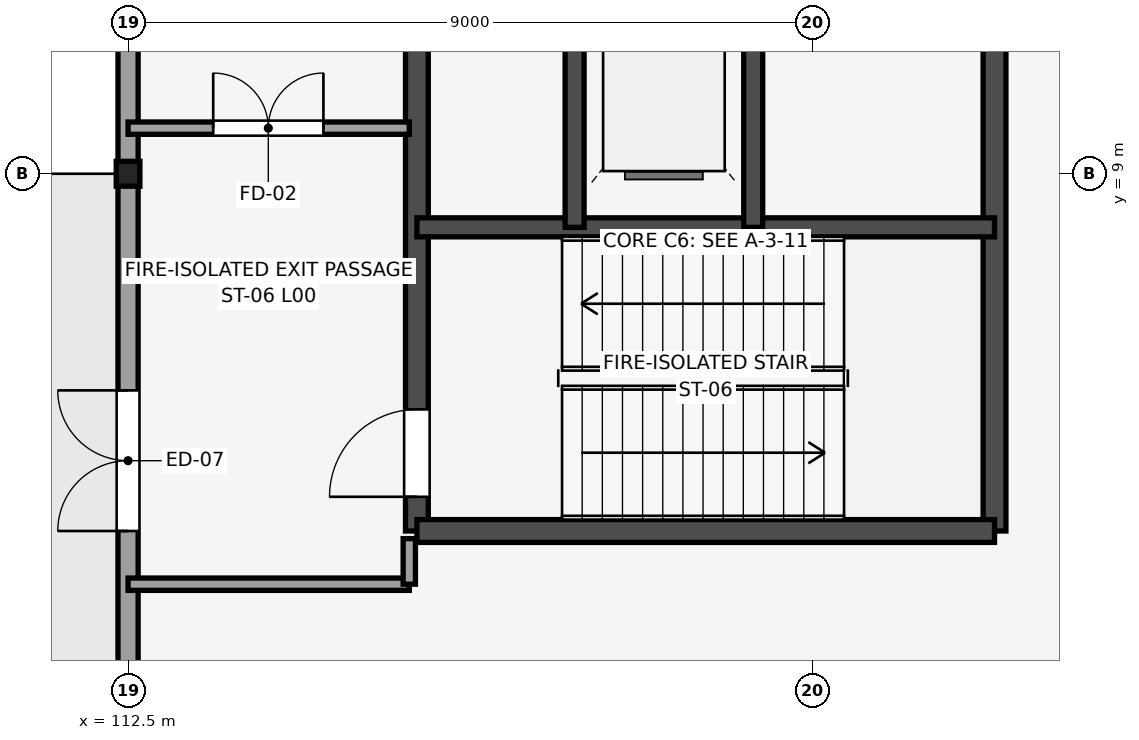
"""IFC4 building model, lengths in metres.
Left out: names, types, materials, properties, quantities, classifications, styles, units other than length and angle.
Written with IfcOpenShell. Run it as: python <this file> out.ifc"""

import sys

from ifc_helpers import new_model, si_unit, direction, frame, frame_2d, origin, origin_2d, place, context, subcontext, project, spatial, rectangle, i_section, extrude, element, fill, save


model = new_model("IFC4")
c1 = context("Model", 3, precision=1e-05, world=origin(), true_north=direction((0.0, 1.0)))
c2 = subcontext(c1, "Body", "Model", "MODEL_VIEW")
j1 = project(units=[si_unit("LENGTHUNIT", "METRE"), si_unit("PLANEANGLEUNIT", "RADIAN")], contexts=[c1])
p1 = place(None, origin())
s1 = spatial("IfcSite", under=j1, at=p1, CompositionType="ELEMENT")
p2 = place(p1, origin())
s2 = spatial("IfcBuilding", under=s1, at=p2, CompositionType="ELEMENT")
p3 = place(p2, origin())
s3 = spatial("IfcBuildingStorey", under=s2, at=p3, CompositionType="ELEMENT", Elevation=0.0)
p4 = place(p3, frame((112.5, 9.0, -0.24), z_axis=(0.0, 0.0, 1.0), x_axis=(1.0, 0.0, 0.0)))
e1 = element("IfcColumn", 1, at=p4, inside=s3, PredefinedType="COLUMN", context=c2, shape_type="SweptSolid", body=[
    extrude(i_section(OverallWidth=0.311, OverallDepth=0.327, WebThickness=0.016, FlangeThickness=0.025, FilletRadius=0.017, at=origin_2d()), origin(), (0.0, 0.0, 1.0), 5.64),
])
p5 = place(p3, frame((116.3, 4.3, -0.24), z_axis=(0.0, 0.0, 1.0), x_axis=(0.0, 1.0, 0.0)))
e2 = element("IfcWall", 2, at=p5, inside=s3, PredefinedType="SHEAR", context=c2, shape_type="SweptSolid", body=[
    extrude(rectangle(XDim=7.6, YDim=0.3, at=frame_2d((3.8, 0.0))), origin(), (0.0, 0.0, 1.0), 5.64),
])
p6 = place(p5, frame((0.45, 0.0, 0.24)))
e3 = element("IfcOpeningElement", 3, at=p6, cuts=e2, PredefinedType="OPENING", context=c2, shape_type="SweptSolid", body=[
    extrude(rectangle(XDim=1.15, YDim=2.15, at=frame_2d((0.575, 1.075))), frame((0.0, 0.16, 0.0), z_axis=(0.0, -1.0, 0.0), x_axis=(1.0, 0.0, 0.0)), (0.0, 0.0, 1.0), 0.32),
])
for number, where, z_axis, x_axis in (
    (4, (123.9, 4.3, -0.24), (0.0, 0.0, 1.0), (0.0, 1.0, 0.0)),
    (5, (116.3, 4.3, -0.24), (0.0, 0.0, 1.0), (1.0, 0.0, 0.0)),
):
    element("IfcWall", number, at=place(p3, frame(where, z_axis=z_axis, x_axis=x_axis)), inside=s3, PredefinedType="SHEAR", context=c2, shape_type="SweptSolid", body=[
        extrude(rectangle(XDim=7.6, YDim=0.3, at=frame_2d((3.8, 0.0))), origin(), (0.0, 0.0, 1.0), 5.64),
    ])
p7 = place(p3, frame((116.3, 8.295, -0.24), z_axis=(0.0, 0.0, 1.0), x_axis=(1.0, 0.0, 0.0)))
e6 = element("IfcWall", 6, at=p7, inside=s3, PredefinedType="SHEAR", context=c2, shape_type="SweptSolid", body=[
    extrude(rectangle(XDim=7.6, YDim=0.25, at=frame_2d((3.8, 0.0))), origin(), (0.0, 0.0, 1.0), 5.64),
])
for number, where, z_axis, x_axis in (
    (7, (118.375, 8.295, -0.24), (0.0, 0.0, 1.0), (0.0, 1.0, 0.0)),
    (8, (120.725, 8.295, -0.24), (0.0, 0.0, 1.0), (0.0, 1.0, 0.0)),
):
    element("IfcWall", number, at=place(p3, frame(where, z_axis=z_axis, x_axis=x_axis)), inside=s3, PredefinedType="SHEAR", context=c2, shape_type="SweptSolid", body=[
        extrude(rectangle(XDim=3.605, YDim=0.25, at=frame_2d((1.802, 0.0))), origin(), (0.0, 0.0, 1.0), 5.64),
    ])
p8 = place(p3, frame((112.5, 0.0, 0.0), z_axis=(0.0, 0.0, 1.0), x_axis=(0.0, 1.0, 0.0)))
e9 = element("IfcWall", 9, at=p8, inside=s3, PredefinedType="STANDARD", context=c2, shape_type="SweptSolid", body=[
    extrude(rectangle(XDim=9.0, YDim=0.265, at=frame_2d((4.5, 0.0))), origin(), (0.0, 0.0, 1.0), 4.681),
])
p9 = place(p8, frame((4.3, 0.0, 0.0)))
e10 = element("IfcOpeningElement", 10, at=p9, cuts=e9, PredefinedType="OPENING", context=c2, shape_type="SweptSolid", body=[
    extrude(rectangle(XDim=1.85, YDim=2.2, at=frame_2d((0.925, 1.1))), frame((0.0, 0.143, 0.0), z_axis=(0.0, -1.0, 0.0), x_axis=(1.0, 0.0, 0.0)), (0.0, 0.0, 1.0), 0.285),
])
p10 = place(p3, frame((112.5, 18.0, 0.0), z_axis=(0.0, 0.0, 1.0), x_axis=(0.0, -1.0, 0.0)))
e11 = element("IfcWall", 11, at=p10, inside=s3, PredefinedType="STANDARD", context=c2, shape_type="SweptSolid", body=[
    extrude(rectangle(XDim=9.0, YDim=0.265, at=frame_2d((4.5, 0.0))), origin(), (0.0, 0.0, 1.0), 4.681),
])
p11 = place(p3, frame((112.5, 3.6, 0.0), z_axis=(0.0, 0.0, 1.0), x_axis=(1.0, 0.0, 0.0)))
e12 = element("IfcWall", 12, at=p11, inside=s3, PredefinedType="PARTITIONING", context=c2, shape_type="SweptSolid", body=[
    extrude(rectangle(XDim=3.7, YDim=0.162, at=frame_2d((1.85, 0.0))), origin(), (0.0, 0.0, 1.0), 5.22),
])
p12 = place(p3, frame((116.2, 3.6, 0.0), z_axis=(0.0, 0.0, 1.0), x_axis=(0.0, 1.0, 0.0)))
e13 = element("IfcWall", 13, at=p12, inside=s3, PredefinedType="PARTITIONING", context=c2, shape_type="SweptSolid", body=[
    extrude(rectangle(XDim=0.6, YDim=0.162, at=frame_2d((0.3, 0.0))), origin(), (0.0, 0.0, 1.0), 5.22),
])
p13 = place(p3, frame((112.5, 9.6, 0.0), z_axis=(0.0, 0.0, 1.0), x_axis=(1.0, 0.0, 0.0)))
e14 = element("IfcWall", 14, at=p13, inside=s3, PredefinedType="PARTITIONING", context=c2, shape_type="SweptSolid", body=[
    extrude(rectangle(XDim=3.7, YDim=0.162, at=frame_2d((1.85, 0.0))), origin(), (0.0, 0.0, 1.0), 5.22),
])
p14 = place(p13, frame((1.12, 0.0, 0.0)))
e15 = element("IfcOpeningElement", 15, at=p14, cuts=e14, PredefinedType="OPENING", context=c2, shape_type="SweptSolid", body=[
    extrude(rectangle(XDim=1.45, YDim=2.2, at=frame_2d((0.725, 1.1))), frame((0.0, 0.091, 0.0), z_axis=(0.0, -1.0, 0.0), x_axis=(1.0, 0.0, 0.0)), (0.0, 0.0, 1.0), 0.182),
])
p15 = place(p9, origin())
e16 = element("IfcDoor", 16, at=p15, inside=s3, OperationType="DOUBLE_DOOR_SINGLE_SWING", PredefinedType="DOOR", context=c2, shape_type="SweptSolid", body=[
    extrude(rectangle(XDim=1.85, YDim=2.2, at=frame_2d((0.925, 1.1))), frame((0.0, 0.025, 0.0), z_axis=(0.0, -1.0, 0.0), x_axis=(1.0, 0.0, 0.0)), (0.0, 0.0, 1.0), 0.05),
])
fill(e10, e16)
p16 = place(p6, origin())
e17 = element("IfcDoor", 17, at=p16, inside=s3, OperationType="SINGLE_SWING_LEFT", PredefinedType="DOOR", context=c2, shape_type="SweptSolid", body=[
    extrude(rectangle(XDim=1.15, YDim=2.15, at=frame_2d((0.575, 1.075))), frame((0.0, 0.025, 0.0), z_axis=(0.0, -1.0, 0.0), x_axis=(1.0, 0.0, 0.0)), (0.0, 0.0, 1.0), 0.05),
])
fill(e3, e17)
p17 = place(p14, origin())
e18 = element("IfcDoor", 18, at=p17, inside=s3, OperationType="DOUBLE_DOOR_SINGLE_SWING", PredefinedType="DOOR", context=c2, shape_type="SweptSolid", body=[
    extrude(rectangle(XDim=1.45, YDim=2.2, at=frame_2d((0.725, 1.1))), frame((0.0, 0.025, 0.0), z_axis=(0.0, -1.0, 0.0), x_axis=(1.0, 0.0, 0.0)), (0.0, 0.0, 1.0), 0.05),
])
fill(e15, e18)
save(model, sys.argv[1])
